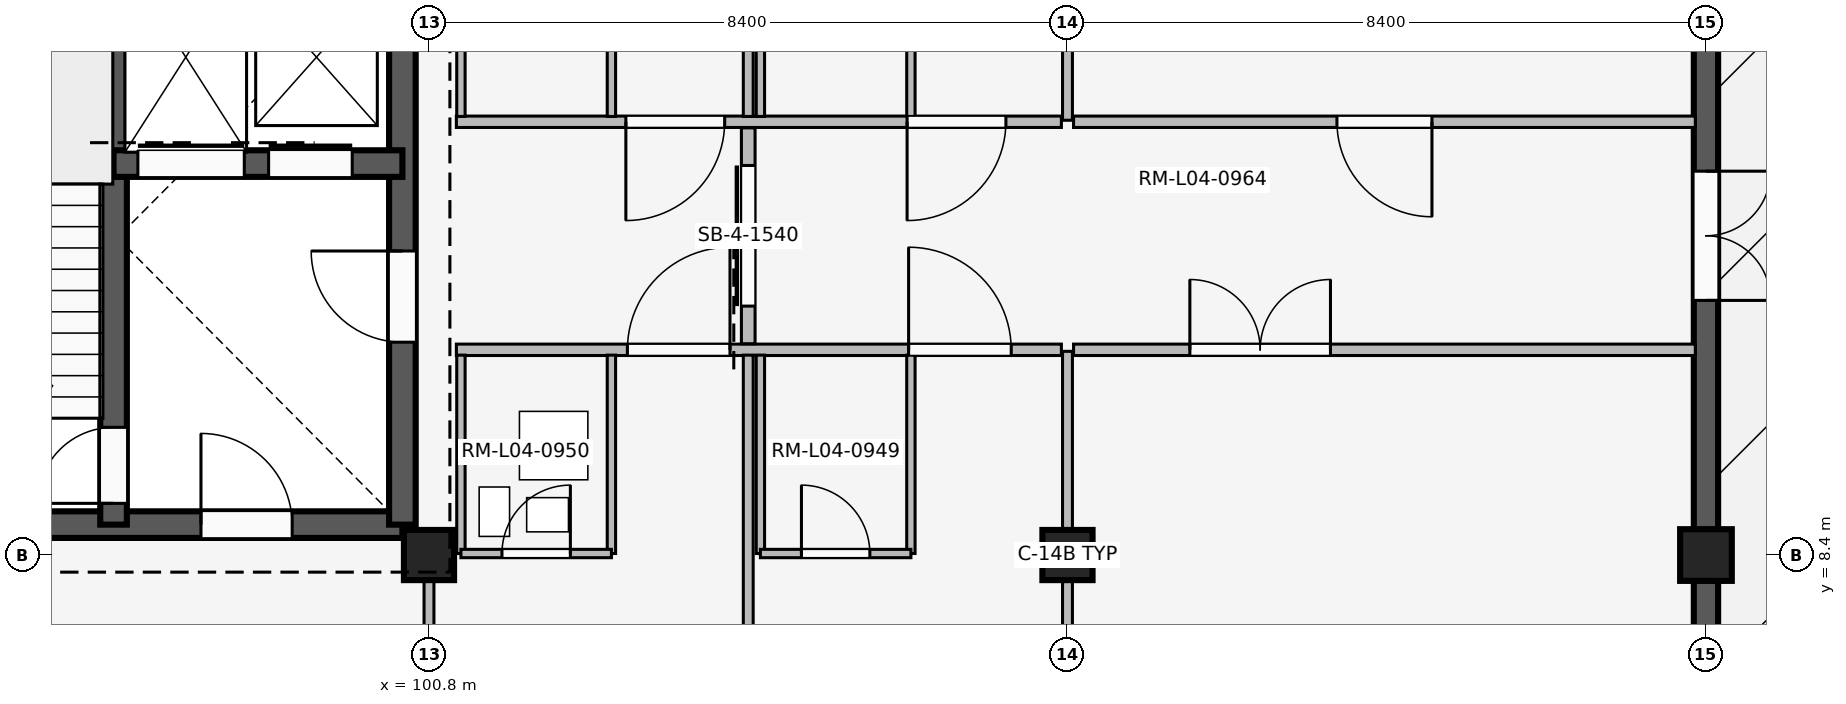
"""IFC4 building model, lengths in metres.
Left out: names, types, materials, properties, quantities, classifications, styles, units other than length and angle.
Written with IfcOpenShell. Run it as: python <this file> out.ifc"""

import sys

from ifc_helpers import new_model, si_unit, direction, frame, frame_2d, origin, origin_2d, place, context, subcontext, project, spatial, rectangle, extrude, element, fill, save


model = new_model("IFC4")
c1 = context("Model", 3, precision=1e-05, world=origin(), true_north=direction((0.0, 1.0)))
c2 = subcontext(c1, "Body", "Model", "MODEL_VIEW")
j1 = project(units=[si_unit("LENGTHUNIT", "METRE"), si_unit("PLANEANGLEUNIT", "RADIAN")], contexts=[c1])
p1 = place(None, origin())
s1 = spatial("IfcSite", under=j1, at=p1, CompositionType="ELEMENT")
p2 = place(p1, origin())
s2 = spatial("IfcBuilding", under=s1, at=p2, CompositionType="ELEMENT")
p3 = place(p2, frame((0.0, 0.0, 16.2)))
s3 = spatial("IfcBuildingStorey", under=s2, at=p3, CompositionType="ELEMENT", Elevation=16.2)
for number, where, z_axis, x_axis in (
    (1, (100.8, 8.4, 0.0), (0.0, 0.0, 1.0), (1.0, 0.0, 0.0)),
    (2, (109.2, 8.4, 0.0), (0.0, 0.0, 1.0), (1.0, 0.0, 0.0)),
):
    element("IfcColumn", number, at=place(p3, frame(where, z_axis=z_axis, x_axis=x_axis)), inside=s3, PredefinedType="COLUMN", context=c2, shape_type="SweptSolid", body=[
        extrude(rectangle(XDim=0.66, YDim=0.66, at=origin_2d()), origin(), (0.0, 0.0, 1.0), 4.2),
    ])
p4 = place(p3, frame((117.6, 8.4, 0.0), z_axis=(0.0, 0.0, 1.0), x_axis=(1.0, 0.0, 0.0)))
e3 = element("IfcColumn", 3, at=p4, inside=s3, PredefinedType="COLUMN", context=c2, shape_type="SweptSolid", body=[
    extrude(rectangle(XDim=0.68, YDim=0.68, at=origin_2d()), origin(), (0.0, 0.0, 1.0), 4.2),
])
p5 = place(p3, frame((117.6, 8.065, 0.0), z_axis=(0.0, 0.0, 1.0), x_axis=(0.0, -1.0, 0.0)))
e4 = element("IfcWall", 4, at=p5, inside=s3, PredefinedType="SOLIDWALL", context=c2, shape_type="SweptSolid", body=[
    extrude(rectangle(XDim=7.73, YDim=0.32, at=frame_2d((3.865, 0.0))), origin(), (0.0, 0.0, 1.0), 3.32),
])
p6 = place(p5, frame((0.968, 0.0, 0.85)))
e5 = element("IfcOpeningElement", 5, at=p6, cuts=e4, PredefinedType="OPENING", context=c2, shape_type="SweptSolid", body=[
    extrude(rectangle(XDim=1.62, YDim=1.52, at=frame_2d((0.81, 0.76))), frame((0.0, 0.17, 0.0), z_axis=(0.0, -1.0, 0.0), x_axis=(1.0, 0.0, 0.0)), (0.0, 0.0, 1.0), 0.34),
])
p7 = place(p5, frame((5.142, 0.0, 0.85)))
e6 = element("IfcOpeningElement", 6, at=p7, cuts=e4, PredefinedType="OPENING", context=c2, shape_type="SweptSolid", body=[
    extrude(rectangle(XDim=1.62, YDim=1.52, at=frame_2d((0.81, 0.76))), frame((0.0, 0.17, 0.0), z_axis=(0.0, -1.0, 0.0), x_axis=(1.0, 0.0, 0.0)), (0.0, 0.0, 1.0), 0.34),
])
p8 = place(p3, frame((117.6, 16.465, 0.0), z_axis=(0.0, 0.0, 1.0), x_axis=(0.0, -1.0, 0.0)))
e7 = element("IfcWall", 7, at=p8, inside=s3, PredefinedType="SOLIDWALL", context=c2, shape_type="SweptSolid", body=[
    extrude(rectangle(XDim=7.73, YDim=0.32, at=frame_2d((3.865, 0.0))), origin(), (0.0, 0.0, 1.0), 3.32),
])
p9 = place(p8, frame((3.015, 0.0, 0.0)))
e8 = element("IfcOpeningElement", 8, at=p9, cuts=e7, PredefinedType="OPENING", context=c2, shape_type="SweptSolid", body=[
    extrude(rectangle(XDim=1.7, YDim=2.3, at=frame_2d((0.85, 1.15))), frame((0.0, 0.17, 0.0), z_axis=(0.0, -1.0, 0.0), x_axis=(1.0, 0.0, 0.0)), (0.0, 0.0, 1.0), 0.34),
])
p10 = place(p3, frame((92.95, 8.8, 0.0), z_axis=(0.0, 0.0, 1.0), x_axis=(1.0, 0.0, 0.0)))
e9 = element("IfcWall", 9, at=p10, inside=s3, PredefinedType="SHEAR", context=c2, shape_type="SweptSolid", body=[
    extrude(rectangle(XDim=7.5, YDim=0.35, at=frame_2d((3.75, 0.0))), origin(), (0.0, 0.0, 1.0), 3.92),
])
p11 = place(p10, frame((4.85, 0.0, 0.0)))
e10 = element("IfcOpeningElement", 10, at=p11, cuts=e9, PredefinedType="OPENING", context=c2, shape_type="SweptSolid", body=[
    extrude(rectangle(XDim=1.2, YDim=2.2, at=frame_2d((0.6, 1.1))), frame((0.0, 0.185, 0.0), z_axis=(0.0, -1.0, 0.0), x_axis=(1.0, 0.0, 0.0)), (0.0, 0.0, 1.0), 0.37),
])
p12 = place(p3, frame((100.45, 8.8, 0.0), z_axis=(0.0, 0.0, 1.0), x_axis=(0.0, 1.0, 0.0)))
e11 = element("IfcWall", 11, at=p12, inside=s3, PredefinedType="SHEAR", context=c2, shape_type="SweptSolid", body=[
    extrude(rectangle(XDim=7.55, YDim=0.35, at=frame_2d((3.775, 0.0))), origin(), (0.0, 0.0, 1.0), 3.92),
])
p13 = place(p12, frame((2.4, 0.0, 0.0)))
e12 = element("IfcOpeningElement", 12, at=p13, cuts=e11, PredefinedType="OPENING", context=c2, shape_type="SweptSolid", body=[
    extrude(rectangle(XDim=1.2, YDim=2.2, at=frame_2d((0.6, 1.1))), frame((0.0, 0.185, 0.0), z_axis=(0.0, -1.0, 0.0), x_axis=(1.0, 0.0, 0.0)), (0.0, 0.0, 1.0), 0.37),
])
p14 = place(p3, frame((96.65, 8.8, 0.0), z_axis=(0.0, 0.0, 1.0), x_axis=(0.0, 1.0, 0.0)))
e13 = element("IfcWall", 13, at=p14, inside=s3, PredefinedType="SHEAR", context=c2, shape_type="SweptSolid", body=[
    extrude(rectangle(XDim=7.55, YDim=0.35, at=frame_2d((3.775, 0.0))), origin(), (0.0, 0.0, 1.0), 3.92),
])
p15 = place(p14, frame((0.28, 0.0, 0.0)))
e14 = element("IfcOpeningElement", 14, at=p15, cuts=e13, PredefinedType="OPENING", context=c2, shape_type="SweptSolid", body=[
    extrude(rectangle(XDim=1.0, YDim=2.15, at=frame_2d((0.5, 1.075))), frame((0.0, 0.185, 0.0), z_axis=(0.0, -1.0, 0.0), x_axis=(1.0, 0.0, 0.0)), (0.0, 0.0, 1.0), 0.37),
])
p16 = place(p3, frame((96.65, 13.55, 0.0), z_axis=(0.0, 0.0, 1.0), x_axis=(1.0, 0.0, 0.0)))
e15 = element("IfcWall", 15, at=p16, inside=s3, PredefinedType="SHEAR", context=c2, shape_type="SweptSolid", body=[
    extrude(rectangle(XDim=3.8, YDim=0.35, at=frame_2d((1.9, 0.0))), origin(), (0.0, 0.0, 1.0), 3.92),
])
p17 = place(p16, frame((0.32, 0.0, 0.0)))
e16 = element("IfcOpeningElement", 16, at=p17, cuts=e15, PredefinedType="OPENING", context=c2, shape_type="SweptSolid", body=[
    extrude(rectangle(XDim=1.4, YDim=2.25, at=frame_2d((0.7, 1.125))), frame((0.0, 0.185, 0.0), z_axis=(0.0, -1.0, 0.0), x_axis=(1.0, 0.0, 0.0)), (0.0, 0.0, 1.0), 0.37),
])
p18 = place(p16, frame((2.04, 0.0, 0.0)))
e17 = element("IfcOpeningElement", 17, at=p18, cuts=e15, PredefinedType="OPENING", context=c2, shape_type="SweptSolid", body=[
    extrude(rectangle(XDim=1.1, YDim=2.15, at=frame_2d((0.55, 1.075))), frame((0.0, 0.185, 0.0), z_axis=(0.0, -1.0, 0.0), x_axis=(1.0, 0.0, 0.0)), (0.0, 0.0, 1.0), 0.37),
])
p19 = place(p3, frame((100.8, 0.14, 0.0), z_axis=(0.0, 0.0, 1.0), x_axis=(0.0, 1.0, 0.0)))
e18 = element("IfcWall", 18, at=p19, inside=s3, PredefinedType="PARTITIONING", context=c2, shape_type="SweptSolid", body=[
    extrude(rectangle(XDim=8.21, YDim=0.13, at=frame_2d((4.105, 0.0))), origin(), (0.0, 0.0, 1.0), 3.3),
])
p20 = place(p19, frame((3.64, 0.0, 0.0)))
e19 = element("IfcOpeningElement", 19, at=p20, cuts=e18, PredefinedType="OPENING", context=c2, shape_type="SweptSolid", body=[
    extrude(rectangle(XDim=1.08, YDim=2.15, at=frame_2d((0.54, 1.075))), frame((0.0, 0.075, 0.0), z_axis=(0.0, -1.0, 0.0), x_axis=(1.0, 0.0, 0.0)), (0.0, 0.0, 1.0), 0.15),
])
p21 = place(p3, frame((101.16, 11.1, 0.0), z_axis=(0.0, 0.0, 1.0), x_axis=(1.0, 0.0, 0.0)))
e20 = element("IfcWall", 20, at=p21, inside=s3, PredefinedType="PARTITIONING", context=c2, shape_type="SweptSolid", body=[
    extrude(rectangle(XDim=7.96, YDim=0.15, at=frame_2d((3.98, 0.0))), origin(), (0.0, 0.0, 1.0), 3.3),
])
p22 = place(p21, frame((2.25, 0.0, 0.0)))
e21 = element("IfcOpeningElement", 21, at=p22, cuts=e20, PredefinedType="OPENING", context=c2, shape_type="SweptSolid", body=[
    extrude(rectangle(XDim=1.35, YDim=2.25, at=frame_2d((0.675, 1.125))), frame((0.0, 0.085, 0.0), z_axis=(0.0, -1.0, 0.0), x_axis=(1.0, 0.0, 0.0)), (0.0, 0.0, 1.0), 0.17),
])
p23 = place(p21, frame((5.95, 0.0, 0.0)))
e22 = element("IfcOpeningElement", 22, at=p23, cuts=e20, PredefinedType="OPENING", context=c2, shape_type="SweptSolid", body=[
    extrude(rectangle(XDim=1.35, YDim=2.25, at=frame_2d((0.675, 1.125))), frame((0.0, 0.085, 0.0), z_axis=(0.0, -1.0, 0.0), x_axis=(1.0, 0.0, 0.0)), (0.0, 0.0, 1.0), 0.17),
])
p24 = place(p3, frame((105.0, 0.1, 0.0), z_axis=(0.0, 0.0, 1.0), x_axis=(0.0, 1.0, 0.0)))
e23 = element("IfcWall", 23, at=p24, inside=s3, PredefinedType="PARTITIONING", context=c2, shape_type="SweptSolid", body=[
    extrude(rectangle(XDim=10.93, YDim=0.13, at=frame_2d((5.465, 0.0))), origin(), (0.0, 0.0, 1.0), 3.3),
])
for number, where, z_axis, x_axis in (
    (24, (101.22, 8.42, 0.0), (0.0, 0.0, 1.0), (0.0, 1.0, 0.0)),
    (25, (103.2, 8.42, 0.0), (0.0, 0.0, 1.0), (0.0, 1.0, 0.0)),
):
    element("IfcWall", number, at=place(p3, frame(where, z_axis=z_axis, x_axis=x_axis)), inside=s3, PredefinedType="PARTITIONING", context=c2, shape_type="SweptSolid", body=[
        extrude(rectangle(XDim=2.61, YDim=0.11, at=frame_2d((1.305, 0.0))), origin(), (0.0, 0.0, 1.0), 3.3),
    ])
p25 = place(p3, frame((101.22, 8.42, 0.0), z_axis=(0.0, 0.0, 1.0), x_axis=(1.0, 0.0, 0.0)))
e26 = element("IfcWall", 26, at=p25, inside=s3, PredefinedType="PARTITIONING", context=c2, shape_type="SweptSolid", body=[
    extrude(rectangle(XDim=1.98, YDim=0.11, at=frame_2d((0.99, 0.0))), origin(), (0.0, 0.0, 1.0), 3.3),
])
p26 = place(p25, frame((0.54, 0.0, 0.0)))
e27 = element("IfcOpeningElement", 27, at=p26, cuts=e26, PredefinedType="OPENING", context=c2, shape_type="SweptSolid", body=[
    extrude(rectangle(XDim=0.9, YDim=2.1, at=frame_2d((0.45, 1.05))), frame((0.0, 0.065, 0.0), z_axis=(0.0, -1.0, 0.0), x_axis=(1.0, 0.0, 0.0)), (0.0, 0.0, 1.0), 0.13),
])
for number, where, z_axis, x_axis in (
    (28, (105.16, 8.42, 0.0), (0.0, 0.0, 1.0), (0.0, 1.0, 0.0)),
    (29, (107.14, 8.42, 0.0), (0.0, 0.0, 1.0), (0.0, 1.0, 0.0)),
):
    element("IfcWall", number, at=place(p3, frame(where, z_axis=z_axis, x_axis=x_axis)), inside=s3, PredefinedType="PARTITIONING", context=c2, shape_type="SweptSolid", body=[
        extrude(rectangle(XDim=2.61, YDim=0.11, at=frame_2d((1.305, 0.0))), origin(), (0.0, 0.0, 1.0), 3.3),
    ])
p27 = place(p3, frame((105.16, 8.42, 0.0), z_axis=(0.0, 0.0, 1.0), x_axis=(1.0, 0.0, 0.0)))
e30 = element("IfcWall", 30, at=p27, inside=s3, PredefinedType="PARTITIONING", context=c2, shape_type="SweptSolid", body=[
    extrude(rectangle(XDim=1.98, YDim=0.11, at=frame_2d((0.99, 0.0))), origin(), (0.0, 0.0, 1.0), 3.3),
])
p28 = place(p27, frame((0.54, 0.0, 0.0)))
e31 = element("IfcOpeningElement", 31, at=p28, cuts=e30, PredefinedType="OPENING", context=c2, shape_type="SweptSolid", body=[
    extrude(rectangle(XDim=0.9, YDim=2.1, at=frame_2d((0.45, 1.05))), frame((0.0, 0.065, 0.0), z_axis=(0.0, -1.0, 0.0), x_axis=(1.0, 0.0, 0.0)), (0.0, 0.0, 1.0), 0.13),
])
p29 = place(p3, frame((109.12, 14.1, 0.0), z_axis=(0.0, 0.0, 1.0), x_axis=(-1.0, 0.0, 0.0)))
e32 = element("IfcWall", 32, at=p29, inside=s3, PredefinedType="PARTITIONING", context=c2, shape_type="SweptSolid", body=[
    extrude(rectangle(XDim=7.96, YDim=0.15, at=frame_2d((3.98, 0.0))), origin(), (0.0, 0.0, 1.0), 3.3),
])
p30 = place(p29, frame((0.73, 0.0, 0.0)))
e33 = element("IfcOpeningElement", 33, at=p30, cuts=e32, PredefinedType="OPENING", context=c2, shape_type="SweptSolid", body=[
    extrude(rectangle(XDim=1.3, YDim=2.25, at=frame_2d((0.65, 1.125))), frame((0.0, 0.085, 0.0), z_axis=(0.0, -1.0, 0.0), x_axis=(1.0, 0.0, 0.0)), (0.0, 0.0, 1.0), 0.17),
])
p31 = place(p29, frame((4.43, 0.0, 0.0)))
e34 = element("IfcOpeningElement", 34, at=p31, cuts=e32, PredefinedType="OPENING", context=c2, shape_type="SweptSolid", body=[
    extrude(rectangle(XDim=1.3, YDim=2.25, at=frame_2d((0.65, 1.125))), frame((0.0, 0.085, 0.0), z_axis=(0.0, -1.0, 0.0), x_axis=(1.0, 0.0, 0.0)), (0.0, 0.0, 1.0), 0.17),
])
p32 = place(p3, frame((105.0, 14.17, 0.0), z_axis=(0.0, 0.0, 1.0), x_axis=(0.0, 1.0, 0.0)))
e35 = element("IfcWall", 35, at=p32, inside=s3, PredefinedType="PARTITIONING", context=c2, shape_type="SweptSolid", body=[
    extrude(rectangle(XDim=10.93, YDim=0.13, at=frame_2d((5.465, 0.0))), origin(), (0.0, 0.0, 1.0), 3.3),
])
for number, where, z_axis, x_axis in (
    (36, (101.22, 14.17, 0.0), (0.0, 0.0, 1.0), (0.0, 1.0, 0.0)),
    (37, (103.2, 14.17, 0.0), (0.0, 0.0, 1.0), (0.0, 1.0, 0.0)),
    (38, (105.16, 14.17, 0.0), (0.0, 0.0, 1.0), (0.0, 1.0, 0.0)),
    (39, (107.14, 14.17, 0.0), (0.0, 0.0, 1.0), (0.0, 1.0, 0.0)),
):
    element("IfcWall", number, at=place(p3, frame(where, z_axis=z_axis, x_axis=x_axis)), inside=s3, PredefinedType="PARTITIONING", context=c2, shape_type="SweptSolid", body=[
        extrude(rectangle(XDim=2.61, YDim=0.11, at=frame_2d((1.305, 0.0))), origin(), (0.0, 0.0, 1.0), 3.3),
    ])
p33 = place(p3, frame((105.0, 11.18, 0.0), z_axis=(0.0, 0.0, 1.0), x_axis=(0.0, 1.0, 0.0)))
e40 = element("IfcWall", 40, at=p33, inside=s3, PredefinedType="PARTITIONING", context=c2, shape_type="SweptSolid", body=[
    extrude(rectangle(XDim=2.84, YDim=0.18, at=frame_2d((1.42, 0.0))), origin(), (0.0, 0.0, 1.0), 3.3),
])
p34 = place(p33, frame((0.495, 0.0, 0.0)))
e41 = element("IfcOpeningElement", 41, at=p34, cuts=e40, PredefinedType="OPENING", context=c2, shape_type="SweptSolid", body=[
    extrude(rectangle(XDim=1.85, YDim=2.3, at=frame_2d((0.925, 1.15))), frame((0.0, 0.1, 0.0), z_axis=(0.0, -1.0, 0.0), x_axis=(1.0, 0.0, 0.0)), (0.0, 0.0, 1.0), 0.2),
])
p35 = place(p3, frame((109.2, 0.14, 0.0), z_axis=(0.0, 0.0, 1.0), x_axis=(0.0, 1.0, 0.0)))
e42 = element("IfcWall", 42, at=p35, inside=s3, PredefinedType="PARTITIONING", context=c2, shape_type="SweptSolid", body=[
    extrude(rectangle(XDim=10.94, YDim=0.13, at=frame_2d((5.47, 0.0))), origin(), (0.0, 0.0, 1.0), 3.3),
])
p36 = place(p3, frame((109.2, 14.12, 0.0), z_axis=(0.0, 0.0, 1.0), x_axis=(0.0, 1.0, 0.0)))
e43 = element("IfcWall", 43, at=p36, inside=s3, PredefinedType="PARTITIONING", context=c2, shape_type="SweptSolid", body=[
    extrude(rectangle(XDim=10.94, YDim=0.13, at=frame_2d((5.47, 0.0))), origin(), (0.0, 0.0, 1.0), 3.3),
])
p37 = place(p3, frame((109.28, 11.1, 0.0), z_axis=(0.0, 0.0, 1.0), x_axis=(1.0, 0.0, 0.0)))
e44 = element("IfcWall", 44, at=p37, inside=s3, PredefinedType="PARTITIONING", context=c2, shape_type="SweptSolid", body=[
    extrude(rectangle(XDim=8.18, YDim=0.15, at=frame_2d((4.09, 0.0))), origin(), (0.0, 0.0, 1.0), 3.3),
])
p38 = place(p37, frame((1.53, 0.0, 0.0)))
e45 = element("IfcOpeningElement", 45, at=p38, cuts=e44, PredefinedType="OPENING", context=c2, shape_type="SweptSolid", body=[
    extrude(rectangle(XDim=1.85, YDim=2.3, at=frame_2d((0.925, 1.15))), frame((0.0, 0.085, 0.0), z_axis=(0.0, -1.0, 0.0), x_axis=(1.0, 0.0, 0.0)), (0.0, 0.0, 1.0), 0.17),
])
p39 = place(p3, frame((117.46, 14.1, 0.0), z_axis=(0.0, 0.0, 1.0), x_axis=(-1.0, 0.0, 0.0)))
e46 = element("IfcWall", 46, at=p39, inside=s3, PredefinedType="PARTITIONING", context=c2, shape_type="SweptSolid", body=[
    extrude(rectangle(XDim=8.18, YDim=0.15, at=frame_2d((4.09, 0.0))), origin(), (0.0, 0.0, 1.0), 3.3),
])
p40 = place(p39, frame((3.465, 0.0, 0.0)))
e47 = element("IfcOpeningElement", 47, at=p40, cuts=e46, PredefinedType="OPENING", context=c2, shape_type="SweptSolid", body=[
    extrude(rectangle(XDim=1.25, YDim=2.2, at=frame_2d((0.625, 1.1))), frame((0.0, 0.085, 0.0), z_axis=(0.0, -1.0, 0.0), x_axis=(1.0, 0.0, 0.0)), (0.0, 0.0, 1.0), 0.17),
])
p41 = place(p9, origin())
e48 = element("IfcDoor", 48, at=p41, inside=s3, OperationType="DOUBLE_SWING_LEFT", PredefinedType="DOOR", context=c2, shape_type="SweptSolid", body=[
    extrude(rectangle(XDim=1.7, YDim=2.3, at=frame_2d((0.85, 1.15))), frame((0.0, 0.025, 0.0), z_axis=(0.0, -1.0, 0.0), x_axis=(1.0, 0.0, 0.0)), (0.0, 0.0, 1.0), 0.05),
])
fill(e8, e48)
p42 = place(p13, origin())
e49 = element("IfcDoor", 49, at=p42, inside=s3, OperationType="SINGLE_SWING_RIGHT", PredefinedType="DOOR", context=c2, shape_type="SweptSolid", body=[
    extrude(rectangle(XDim=1.2, YDim=2.2, at=frame_2d((0.6, 1.1))), frame((0.0, 0.025, 0.0), z_axis=(0.0, -1.0, 0.0), x_axis=(1.0, 0.0, 0.0)), (0.0, 0.0, 1.0), 0.05),
])
fill(e12, e49)
p43 = place(p11, origin())
e50 = element("IfcDoor", 50, at=p43, inside=s3, OperationType="SINGLE_SWING_LEFT", PredefinedType="DOOR", context=c2, shape_type="SweptSolid", body=[
    extrude(rectangle(XDim=1.2, YDim=2.2, at=frame_2d((0.6, 1.1))), frame((0.0, 0.025, 0.0), z_axis=(0.0, -1.0, 0.0), x_axis=(1.0, 0.0, 0.0)), (0.0, 0.0, 1.0), 0.05),
])
fill(e10, e50)
p44 = place(p15, origin())
e51 = element("IfcDoor", 51, at=p44, inside=s3, OperationType="SINGLE_SWING_LEFT", PredefinedType="DOOR", context=c2, shape_type="SweptSolid", body=[
    extrude(rectangle(XDim=1.0, YDim=2.15, at=frame_2d((0.5, 1.075))), frame((0.0, 0.025, 0.0), z_axis=(0.0, -1.0, 0.0), x_axis=(1.0, 0.0, 0.0)), (0.0, 0.0, 1.0), 0.05),
])
fill(e14, e51)
p45 = place(p17, origin())
e52 = element("IfcDoor", 52, at=p45, inside=s3, OperationType="SLIDING_TO_LEFT", PredefinedType="DOOR", context=c2, shape_type="SweptSolid", body=[
    extrude(rectangle(XDim=1.4, YDim=2.25, at=frame_2d((0.7, 1.125))), frame((0.0, 0.025, 0.0), z_axis=(0.0, -1.0, 0.0), x_axis=(1.0, 0.0, 0.0)), (0.0, 0.0, 1.0), 0.05),
])
fill(e16, e52)
p46 = place(p18, origin())
e53 = element("IfcDoor", 53, at=p46, inside=s3, OperationType="SLIDING_TO_LEFT", PredefinedType="DOOR", context=c2, shape_type="SweptSolid", body=[
    extrude(rectangle(XDim=1.1, YDim=2.15, at=frame_2d((0.55, 1.075))), frame((0.0, 0.025, 0.0), z_axis=(0.0, -1.0, 0.0), x_axis=(1.0, 0.0, 0.0)), (0.0, 0.0, 1.0), 0.05),
])
fill(e17, e53)
p47 = place(p22, origin())
e54 = element("IfcDoor", 54, at=p47, inside=s3, OperationType="SINGLE_SWING_RIGHT", PredefinedType="DOOR", context=c2, shape_type="SweptSolid", body=[
    extrude(rectangle(XDim=1.35, YDim=2.25, at=frame_2d((0.675, 1.125))), frame((0.0, 0.025, 0.0), z_axis=(0.0, -1.0, 0.0), x_axis=(1.0, 0.0, 0.0)), (0.0, 0.0, 1.0), 0.05),
])
fill(e21, e54)
p48 = place(p23, origin())
e55 = element("IfcDoor", 55, at=p48, inside=s3, OperationType="SINGLE_SWING_LEFT", PredefinedType="DOOR", context=c2, shape_type="SweptSolid", body=[
    extrude(rectangle(XDim=1.35, YDim=2.25, at=frame_2d((0.675, 1.125))), frame((0.0, 0.025, 0.0), z_axis=(0.0, -1.0, 0.0), x_axis=(1.0, 0.0, 0.0)), (0.0, 0.0, 1.0), 0.05),
])
fill(e22, e55)
p49 = place(p26, origin())
e56 = element("IfcDoor", 56, at=p49, inside=s3, OperationType="SINGLE_SWING_RIGHT", PredefinedType="DOOR", context=c2, shape_type="SweptSolid", body=[
    extrude(rectangle(XDim=0.9, YDim=2.1, at=frame_2d((0.45, 1.05))), frame((0.0, 0.025, 0.0), z_axis=(0.0, -1.0, 0.0), x_axis=(1.0, 0.0, 0.0)), (0.0, 0.0, 1.0), 0.05),
])
fill(e27, e56)
p50 = place(p28, origin())
e57 = element("IfcDoor", 57, at=p50, inside=s3, OperationType="SINGLE_SWING_LEFT", PredefinedType="DOOR", context=c2, shape_type="SweptSolid", body=[
    extrude(rectangle(XDim=0.9, YDim=2.1, at=frame_2d((0.45, 1.05))), frame((0.0, 0.025, 0.0), z_axis=(0.0, -1.0, 0.0), x_axis=(1.0, 0.0, 0.0)), (0.0, 0.0, 1.0), 0.05),
])
fill(e31, e57)
p51 = place(p30, origin())
e58 = element("IfcDoor", 58, at=p51, inside=s3, OperationType="SINGLE_SWING_RIGHT", PredefinedType="DOOR", context=c2, shape_type="SweptSolid", body=[
    extrude(rectangle(XDim=1.3, YDim=2.25, at=frame_2d((0.65, 1.125))), frame((0.0, 0.025, 0.0), z_axis=(0.0, -1.0, 0.0), x_axis=(1.0, 0.0, 0.0)), (0.0, 0.0, 1.0), 0.05),
])
fill(e33, e58)
p52 = place(p31, origin())
e59 = element("IfcDoor", 59, at=p52, inside=s3, OperationType="SINGLE_SWING_RIGHT", PredefinedType="DOOR", context=c2, shape_type="SweptSolid", body=[
    extrude(rectangle(XDim=1.3, YDim=2.25, at=frame_2d((0.65, 1.125))), frame((0.0, 0.025, 0.0), z_axis=(0.0, -1.0, 0.0), x_axis=(1.0, 0.0, 0.0)), (0.0, 0.0, 1.0), 0.05),
])
fill(e34, e59)
p53 = place(p34, origin())
e60 = element("IfcDoor", 60, at=p53, inside=s3, OperationType="SLIDING_TO_LEFT", PredefinedType="DOOR", context=c2, shape_type="SweptSolid", body=[
    extrude(rectangle(XDim=1.85, YDim=2.3, at=frame_2d((0.925, 1.15))), frame((0.0, 0.025, 0.0), z_axis=(0.0, -1.0, 0.0), x_axis=(1.0, 0.0, 0.0)), (0.0, 0.0, 1.0), 0.05),
])
fill(e41, e60)
p54 = place(p38, origin())
e61 = element("IfcDoor", 61, at=p54, inside=s3, OperationType="DOUBLE_SWING_LEFT", PredefinedType="DOOR", context=c2, shape_type="SweptSolid", body=[
    extrude(rectangle(XDim=1.85, YDim=2.3, at=frame_2d((0.925, 1.15))), frame((0.0, 0.025, 0.0), z_axis=(0.0, -1.0, 0.0), x_axis=(1.0, 0.0, 0.0)), (0.0, 0.0, 1.0), 0.05),
])
fill(e45, e61)
p55 = place(p40, origin())
e62 = element("IfcDoor", 62, at=p55, inside=s3, OperationType="SINGLE_SWING_LEFT", PredefinedType="DOOR", context=c2, shape_type="SweptSolid", body=[
    extrude(rectangle(XDim=1.25, YDim=2.2, at=frame_2d((0.625, 1.1))), frame((0.0, 0.025, 0.0), z_axis=(0.0, -1.0, 0.0), x_axis=(1.0, 0.0, 0.0)), (0.0, 0.0, 1.0), 0.05),
])
fill(e47, e62)
save(model, sys.argv[1])
